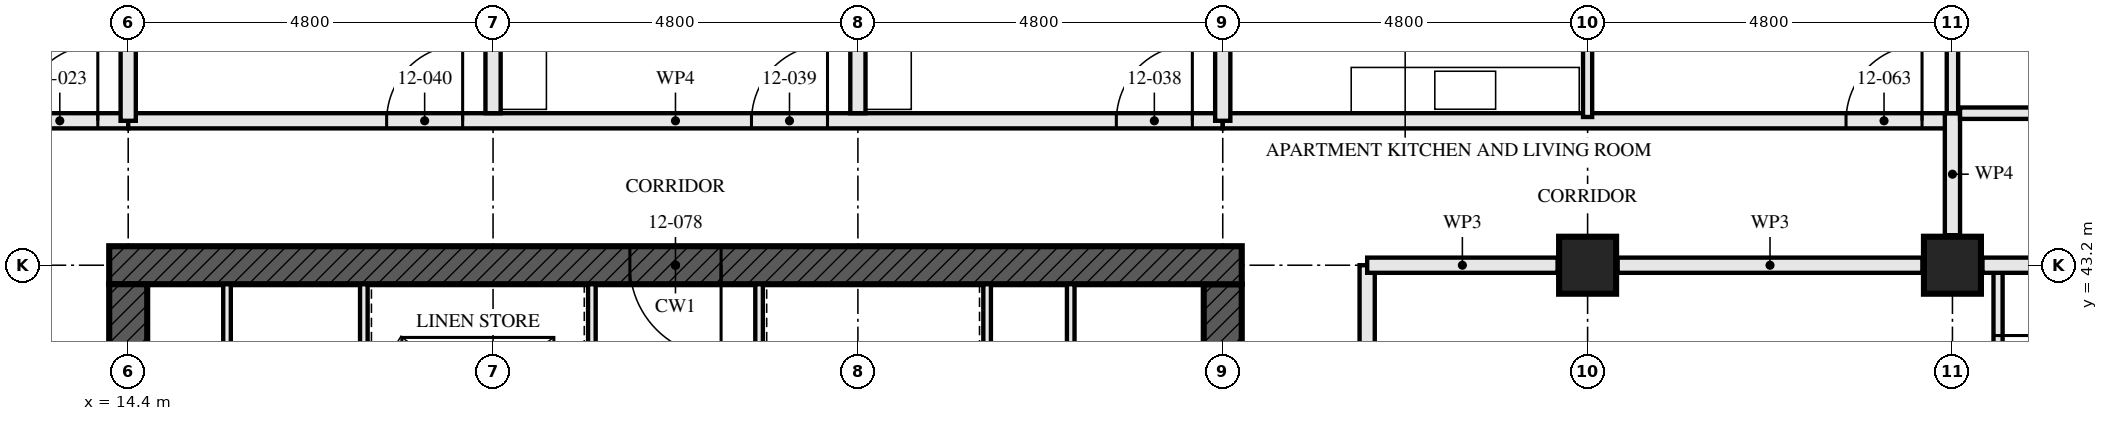
"""IFC4 building model, lengths in metres.
Left out: names, types, materials, properties, quantities, classifications, styles, units other than length and angle.
Written with IfcOpenShell. Run it as: python <this file> out.ifc"""

import sys

from ifc_helpers import new_model, si_unit, direction, frame, frame_2d, origin, origin_2d, place, context, subcontext, project, spatial, rectangle, hollow_rectangle, extrude, element, fill, save


model = new_model("IFC4")
c1 = context("Model", 3, precision=1e-05, world=origin(), true_north=direction((0.0, 1.0)))
c2 = subcontext(c1, "Body", "Model", "MODEL_VIEW")
j1 = project(units=[si_unit("LENGTHUNIT", "METRE"), si_unit("PLANEANGLEUNIT", "RADIAN")], contexts=[c1])
p1 = place(None, origin())
s1 = spatial("IfcSite", under=j1, at=p1, CompositionType="ELEMENT")
p2 = place(p1, origin())
s2 = spatial("IfcBuilding", under=s1, at=p2, CompositionType="ELEMENT")
p3 = place(p2, frame((0.0, 0.0, 48.0)))
s3 = spatial("IfcBuildingStorey", under=s2, at=p3, CompositionType="ELEMENT", Elevation=48.0)
for number, where, z_axis, x_axis in (
    (1, (33.6, 43.2, 0.0), (0.0, 0.0, 1.0), (0.0, 1.0, 0.0)),
    (2, (38.4, 43.2, 0.0), (0.0, 0.0, 1.0), (0.0, 1.0, 0.0)),
):
    element("IfcColumn", number, at=place(p3, frame(where, z_axis=z_axis, x_axis=x_axis)), inside=s3, PredefinedType="COLUMN", context=c2, shape_type="SweptSolid", body=[
        extrude(hollow_rectangle(XDim=0.75, YDim=0.75, WallThickness=0.08, at=origin_2d()), origin(), (0.0, 0.0, 1.0), 3.5),
    ])
p4 = place(p3, frame((29.05, 43.2, -0.17), z_axis=(0.0, 0.0, 1.0), x_axis=(-1.0, 0.0, 0.0)))
e3 = element("IfcWall", 3, at=p4, inside=s3, PredefinedType="SHEAR", context=c2, shape_type="SweptSolid", body=[
    extrude(rectangle(XDim=14.9, YDim=0.5, at=frame_2d((7.45, 0.0))), origin(), (0.0, 0.0, 1.0), 3.5),
])
p5 = place(p4, frame((6.85, 0.0, 0.17)))
e4 = element("IfcOpeningElement", 4, at=p5, cuts=e3, PredefinedType="OPENING", context=c2, shape_type="SweptSolid", body=[
    extrude(rectangle(XDim=1.2, YDim=2.1, at=frame_2d((0.6, 1.05))), frame((0.0, 0.26, 0.0), z_axis=(0.0, -1.0, 0.0), x_axis=(1.0, 0.0, 0.0)), (0.0, 0.0, 1.0), 0.521),
])
p6 = place(p3, frame((14.4, 42.95, -0.17), z_axis=(0.0, 0.0, 1.0), x_axis=(0.0, -1.0, 0.0)))
e5 = element("IfcWall", 5, at=p6, inside=s3, PredefinedType="SHEAR", context=c2, shape_type="SweptSolid", body=[
    extrude(rectangle(XDim=13.9, YDim=0.5, at=frame_2d((6.95, 0.0))), origin(), (0.0, 0.0, 1.0), 3.5),
])
p7 = place(p6, frame((6.35, 0.0, 0.17)))
e6 = element("IfcOpeningElement", 6, at=p7, cuts=e5, PredefinedType="OPENING", context=c2, shape_type="SweptSolid", body=[
    extrude(rectangle(XDim=1.2, YDim=2.1, at=frame_2d((0.6, 1.05))), frame((0.0, 0.26, 0.0), z_axis=(0.0, -1.0, 0.0), x_axis=(1.0, 0.0, 0.0)), (0.0, 0.0, 1.0), 0.521),
])
p8 = place(p3, frame((28.8, 29.05, -0.17), z_axis=(0.0, 0.0, 1.0), x_axis=(0.0, 1.0, 0.0)))
e7 = element("IfcWall", 7, at=p8, inside=s3, PredefinedType="SHEAR", context=c2, shape_type="SweptSolid", body=[
    extrude(rectangle(XDim=13.9, YDim=0.5, at=frame_2d((6.95, 0.0))), origin(), (0.0, 0.0, 1.0), 3.5),
])
p9 = place(p8, frame((6.35, 0.0, 0.17)))
e8 = element("IfcOpeningElement", 8, at=p9, cuts=e7, PredefinedType="OPENING", context=c2, shape_type="SweptSolid", body=[
    extrude(rectangle(XDim=1.2, YDim=2.1, at=frame_2d((0.6, 1.05))), frame((0.0, 0.26, 0.0), z_axis=(0.0, -1.0, 0.0), x_axis=(1.0, 0.0, 0.0)), (0.0, 0.0, 1.0), 0.521),
])
p10 = place(p3, frame((14.4, 45.1, 0.0), z_axis=(0.0, 0.0, 1.0), x_axis=(-1.0, 0.0, 0.0)))
e9 = element("IfcWall", 9, at=p10, inside=s3, PredefinedType="PARTITIONING", context=c2, shape_type="SweptSolid", body=[
    extrude(rectangle(XDim=9.6, YDim=0.2, at=frame_2d((4.8, 0.0))), origin(), (0.0, 0.0, 1.0), 3.33),
])
p11 = place(p10, frame((0.4, 0.0, 0.0)))
e10 = element("IfcOpeningElement", 10, at=p11, cuts=e9, PredefinedType="OPENING", context=c2, shape_type="SweptSolid", body=[
    extrude(rectangle(XDim=1.0, YDim=2.1, at=frame_2d((0.5, 1.05))), frame((0.0, 0.111, 0.0), z_axis=(0.0, -1.0, 0.0), x_axis=(1.0, 0.0, 0.0)), (0.0, 0.0, 1.0), 0.221),
])
for number, where, z_axis, x_axis in (
    (11, (24.0, 57.255, 0.0), (0.0, 0.0, 1.0), (0.0, -1.0, 0.0)),
    (12, (19.2, 57.255, 0.0), (0.0, 0.0, 1.0), (0.0, -1.0, 0.0)),
):
    element("IfcWall", number, at=place(p3, frame(where, z_axis=z_axis, x_axis=x_axis)), inside=s3, PredefinedType="PARTITIONING", context=c2, shape_type="SweptSolid", body=[
        extrude(rectangle(XDim=12.055, YDim=0.2, at=frame_2d((6.027, 0.0))), origin(), (0.0, 0.0, 1.0), 2.55),
    ])
p12 = place(p3, frame((28.8, 45.1, 0.0), z_axis=(0.0, 0.0, 1.0), x_axis=(-1.0, 0.0, 0.0)))
e13 = element("IfcWall", 13, at=p12, inside=s3, PredefinedType="PARTITIONING", context=c2, shape_type="SweptSolid", body=[
    extrude(rectangle(XDim=14.4, YDim=0.2, at=frame_2d((7.2, 0.0))), origin(), (0.0, 0.0, 1.0), 3.33),
])
p13 = place(p12, frame((0.4, 0.0, 0.0)))
e14 = element("IfcOpeningElement", 14, at=p13, cuts=e13, PredefinedType="OPENING", context=c2, shape_type="SweptSolid", body=[
    extrude(rectangle(XDim=1.0, YDim=2.1, at=frame_2d((0.5, 1.05))), frame((0.0, 0.111, 0.0), z_axis=(0.0, -1.0, 0.0), x_axis=(1.0, 0.0, 0.0)), (0.0, 0.0, 1.0), 0.221),
])
p14 = place(p12, frame((5.2, 0.0, 0.0)))
e15 = element("IfcOpeningElement", 15, at=p14, cuts=e13, PredefinedType="OPENING", context=c2, shape_type="SweptSolid", body=[
    extrude(rectangle(XDim=1.0, YDim=2.1, at=frame_2d((0.5, 1.05))), frame((0.0, 0.111, 0.0), z_axis=(0.0, -1.0, 0.0), x_axis=(1.0, 0.0, 0.0)), (0.0, 0.0, 1.0), 0.221),
])
p15 = place(p12, frame((10.0, 0.0, 0.0)))
e16 = element("IfcOpeningElement", 16, at=p15, cuts=e13, PredefinedType="OPENING", context=c2, shape_type="SweptSolid", body=[
    extrude(rectangle(XDim=1.0, YDim=2.1, at=frame_2d((0.5, 1.05))), frame((0.0, 0.111, 0.0), z_axis=(0.0, -1.0, 0.0), x_axis=(1.0, 0.0, 0.0)), (0.0, 0.0, 1.0), 0.221),
])
p16 = place(p3, frame((39.0, 38.4, 0.0), z_axis=(0.0, 0.0, 1.0), x_axis=(0.0, 1.0, 0.0)))
e17 = element("IfcWall", 17, at=p16, inside=s3, PredefinedType="PARTITIONING", context=c2, shape_type="SweptSolid", body=[
    extrude(rectangle(XDim=4.8, YDim=0.12, at=frame_2d((2.4, 0.0))), origin(), (0.0, 0.0, 1.0), 3.33),
])
p17 = place(p16, frame((2.975, 0.0, 0.0)))
e18 = element("IfcOpeningElement", 18, at=p17, cuts=e17, PredefinedType="OPENING", context=c2, shape_type="SweptSolid", body=[
    extrude(rectangle(XDim=0.9, YDim=2.1, at=frame_2d((0.45, 1.05))), frame((0.0, 0.071, 0.0), z_axis=(0.0, -1.0, 0.0), x_axis=(1.0, 0.0, 0.0)), (0.0, 0.0, 1.0), 0.141),
])
p18 = place(p3, frame((30.7, 28.8, 0.0), z_axis=(0.0, 0.0, 1.0), x_axis=(0.0, 1.0, 0.0)))
e19 = element("IfcWall", 19, at=p18, inside=s3, PredefinedType="PARTITIONING", context=c2, shape_type="SweptSolid", body=[
    extrude(rectangle(XDim=14.4, YDim=0.2, at=frame_2d((7.2, 0.0))), origin(), (0.0, 0.0, 1.0), 2.55),
])
p19 = place(p18, frame((1.4, 0.0, 0.0)))
e20 = element("IfcOpeningElement", 20, at=p19, cuts=e19, PredefinedType="OPENING", context=c2, shape_type="SweptSolid", body=[
    extrude(rectangle(XDim=1.0, YDim=2.1, at=frame_2d((0.5, 1.05))), frame((0.0, 0.111, 0.0), z_axis=(0.0, -1.0, 0.0), x_axis=(1.0, 0.0, 0.0)), (0.0, 0.0, 1.0), 0.221),
])
p20 = place(p18, frame((4.1, 0.0, 0.0)))
e21 = element("IfcOpeningElement", 21, at=p20, cuts=e19, PredefinedType="OPENING", context=c2, shape_type="SweptSolid", body=[
    extrude(rectangle(XDim=1.0, YDim=2.1, at=frame_2d((0.5, 1.05))), frame((0.0, 0.111, 0.0), z_axis=(0.0, -1.0, 0.0), x_axis=(1.0, 0.0, 0.0)), (0.0, 0.0, 1.0), 0.221),
])
p21 = place(p18, frame((5.975, 0.0, 0.0)))
e22 = element("IfcOpeningElement", 22, at=p21, cuts=e19, PredefinedType="OPENING", context=c2, shape_type="SweptSolid", body=[
    extrude(rectangle(XDim=1.0, YDim=2.1, at=frame_2d((0.5, 1.05))), frame((0.0, 0.111, 0.0), z_axis=(0.0, -1.0, 0.0), x_axis=(1.0, 0.0, 0.0)), (0.0, 0.0, 1.0), 0.221),
])
p22 = place(p18, frame((10.0, 0.0, 0.0)))
e23 = element("IfcOpeningElement", 23, at=p22, cuts=e19, PredefinedType="OPENING", context=c2, shape_type="SweptSolid", body=[
    extrude(rectangle(XDim=1.0, YDim=2.1, at=frame_2d((0.5, 1.05))), frame((0.0, 0.111, 0.0), z_axis=(0.0, -1.0, 0.0), x_axis=(1.0, 0.0, 0.0)), (0.0, 0.0, 1.0), 0.221),
])
p23 = place(p3, frame((38.4, 48.2, 0.0), z_axis=(0.0, 0.0, 1.0), x_axis=(0.0, -1.0, 0.0)))
e24 = element("IfcWall", 24, at=p23, inside=s3, PredefinedType="PARTITIONING", context=c2, shape_type="SweptSolid", body=[
    extrude(rectangle(XDim=3.0, YDim=0.15, at=frame_2d((1.5, 0.0))), origin(), (0.0, 0.0, 1.0), 2.55),
])
p24 = place(p23, frame((1.05, 0.0, 0.0)))
e25 = element("IfcOpeningElement", 25, at=p24, cuts=e24, PredefinedType="OPENING", context=c2, shape_type="SweptSolid", body=[
    extrude(rectangle(XDim=0.9, YDim=2.1, at=frame_2d((0.45, 1.05))), frame((0.0, 0.085, 0.0), z_axis=(0.0, -1.0, 0.0), x_axis=(1.0, 0.0, 0.0)), (0.0, 0.0, 1.0), 0.171),
])
p25 = place(p3, frame((33.6, 53.4, 0.0), z_axis=(0.0, 0.0, 1.0), x_axis=(0.0, -1.0, 0.0)))
e26 = element("IfcWall", 26, at=p25, inside=s3, PredefinedType="PARTITIONING", context=c2, shape_type="SweptSolid", body=[
    extrude(rectangle(XDim=8.25, YDim=0.12, at=frame_2d((4.125, 0.0))), origin(), (0.0, 0.0, 1.0), 2.55),
])
p26 = place(p25, frame((5.15, 0.0, 0.0)))
e27 = element("IfcOpeningElement", 27, at=p26, cuts=e26, PredefinedType="OPENING", context=c2, shape_type="SweptSolid", body=[
    extrude(rectangle(XDim=0.9, YDim=2.1, at=frame_2d((0.45, 1.05))), frame((0.0, 0.071, 0.0), z_axis=(0.0, -1.0, 0.0), x_axis=(1.0, 0.0, 0.0)), (0.0, 0.0, 1.0), 0.141),
])
p27 = place(p3, frame((38.4, 45.1, 0.0), z_axis=(0.0, 0.0, 1.0), x_axis=(-1.0, 0.0, 0.0)))
e28 = element("IfcWall", 28, at=p27, inside=s3, PredefinedType="PARTITIONING", context=c2, shape_type="SweptSolid", body=[
    extrude(rectangle(XDim=9.6, YDim=0.2, at=frame_2d((4.8, 0.0))), origin(), (0.0, 0.0, 1.0), 3.33),
])
p28 = place(p27, frame((0.4, 0.0, 0.0)))
e29 = element("IfcOpeningElement", 29, at=p28, cuts=e28, PredefinedType="OPENING", context=c2, shape_type="SweptSolid", body=[
    extrude(rectangle(XDim=1.0, YDim=2.1, at=frame_2d((0.5, 1.05))), frame((0.0, 0.111, 0.0), z_axis=(0.0, -1.0, 0.0), x_axis=(1.0, 0.0, 0.0)), (0.0, 0.0, 1.0), 0.221),
])
p29 = place(p3, frame((38.4, 45.2, 0.0), z_axis=(0.0, 0.0, 1.0), x_axis=(0.0, -1.0, 0.0)))
e30 = element("IfcWall", 30, at=p29, inside=s3, PredefinedType="PARTITIONING", context=c2, shape_type="SweptSolid", body=[
    extrude(rectangle(XDim=1.605, YDim=0.2, at=frame_2d((0.802, 0.0))), origin(), (0.0, 0.0, 1.0), 3.33),
])
for number, where, z_axis, x_axis in (
    (31, (15.7, 37.15, 0.0), (0.0, 0.0, 1.0), (0.0, 1.0, 0.0)),
    (32, (26.8, 37.15, 0.0), (0.0, 0.0, 1.0), (0.0, 1.0, 0.0)),
):
    element("IfcWall", number, at=place(p3, frame(where, z_axis=z_axis, x_axis=x_axis)), inside=s3, PredefinedType="SOLIDWALL", context=c2, shape_type="SweptSolid", body=[
        extrude(rectangle(XDim=5.8, YDim=0.1, at=frame_2d((2.9, 0.0))), origin(), (0.0, 0.0, 1.0), 3.33),
    ])
p30 = place(p3, frame((20.5, 37.15, 0.0), z_axis=(0.0, 0.0, 1.0), x_axis=(0.0, 1.0, 0.0)))
e33 = element("IfcWall", 33, at=p30, inside=s3, PredefinedType="SOLIDWALL", context=c2, shape_type="SweptSolid", body=[
    extrude(rectangle(XDim=5.8, YDim=0.1, at=frame_2d((2.9, 0.0))), origin(), (0.0, 0.0, 1.0), 3.33),
])
p31 = place(p30, frame((0.925, 0.0, 0.0)))
e34 = element("IfcOpeningElement", 34, at=p31, cuts=e33, PredefinedType="OPENING", context=c2, shape_type="SweptSolid", body=[
    extrude(rectangle(XDim=1.0, YDim=2.1, at=frame_2d((0.5, 1.05))), frame((0.0, 0.061, 0.0), z_axis=(0.0, -1.0, 0.0), x_axis=(1.0, 0.0, 0.0)), (0.0, 0.0, 1.0), 0.121),
])
p32 = place(p30, frame((3.9, 0.0, 0.0)))
e35 = element("IfcOpeningElement", 35, at=p32, cuts=e33, PredefinedType="OPENING", context=c2, shape_type="SweptSolid", body=[
    extrude(rectangle(XDim=1.0, YDim=2.1, at=frame_2d((0.5, 1.05))), frame((0.0, 0.061, 0.0), z_axis=(0.0, -1.0, 0.0), x_axis=(1.0, 0.0, 0.0)), (0.0, 0.0, 1.0), 0.121),
])
for number, where, z_axis, x_axis in (
    (36, (22.7, 37.15, 0.0), (0.0, 0.0, 1.0), (0.0, 1.0, 0.0)),
    (37, (17.5, 37.15, 0.0), (0.0, 0.0, 1.0), (0.0, 1.0, 0.0)),
    (38, (25.7, 37.15, 0.0), (0.0, 0.0, 1.0), (0.0, 1.0, 0.0)),
):
    element("IfcWall", number, at=place(p3, frame(where, z_axis=z_axis, x_axis=x_axis)), inside=s3, PredefinedType="SOLIDWALL", context=c2, shape_type="SweptSolid", body=[
        extrude(rectangle(XDim=5.8, YDim=0.1, at=frame_2d((2.9, 0.0))), origin(), (0.0, 0.0, 1.0), 3.33),
    ])
for number, where, z_axis, x_axis in (
    (39, (14.4, 45.1, 0.0), (0.0, 0.0, 1.0), (0.0, 1.0, 0.0)),
    (40, (28.8, 45.1, 0.0), (0.0, 0.0, 1.0), (0.0, 1.0, 0.0)),
):
    element("IfcWall", number, at=place(p3, frame(where, z_axis=z_axis, x_axis=x_axis)), inside=s3, PredefinedType="PARTITIONING", context=c2, shape_type="SweptSolid", body=[
        extrude(rectangle(XDim=2.555, YDim=0.2, at=frame_2d((1.277, 0.0))), origin(), (0.0, 0.0, 1.0), 2.32),
    ])
p33 = place(p3, frame((42.896, 43.2, 0.0), z_axis=(0.0, 0.0, 1.0), x_axis=(-1.0, 0.0, 0.0)))
e41 = element("IfcWall", 41, at=p33, inside=s3, PredefinedType="PARTITIONING", context=c2, shape_type="SweptSolid", body=[
    extrude(rectangle(XDim=4.101, YDim=0.2, at=frame_2d((2.05, 0.0))), origin(), (0.0, 0.0, 1.0), 2.32),
])
p34 = place(p3, frame((38.005, 43.2, 0.0), z_axis=(0.0, 0.0, 1.0), x_axis=(-1.0, 0.0, 0.0)))
e42 = element("IfcWall", 42, at=p34, inside=s3, PredefinedType="PARTITIONING", context=c2, shape_type="SweptSolid", body=[
    extrude(rectangle(XDim=4.01, YDim=0.2, at=frame_2d((2.005, 0.0))), origin(), (0.0, 0.0, 1.0), 2.32),
])
p35 = place(p3, frame((33.205, 43.2, 0.0), z_axis=(0.0, 0.0, 1.0), x_axis=(-1.0, 0.0, 0.0)))
e43 = element("IfcWall", 43, at=p35, inside=s3, PredefinedType="PARTITIONING", context=c2, shape_type="SweptSolid", body=[
    extrude(rectangle(XDim=2.505, YDim=0.2, at=frame_2d((1.252, 0.0))), origin(), (0.0, 0.0, 1.0), 2.32),
])
p36 = place(p3, frame((43.63, 45.2, 0.0), z_axis=(0.0, 0.0, 1.0), x_axis=(-1.0, 0.0, 0.0)))
e44 = element("IfcWall", 44, at=p36, inside=s3, PredefinedType="PARTITIONING", context=c2, shape_type="SweptSolid", body=[
    extrude(rectangle(XDim=5.13, YDim=0.15, at=frame_2d((2.565, 0.0))), origin(), (0.0, 0.0, 1.0), 2.32),
])
p37 = place(p11, frame((1.0, 0.0, 0.0), z_axis=(0.0, 0.0, 1.0), x_axis=(-1.0, 0.0, 0.0)))
e45 = element("IfcDoor", 45, at=p37, inside=s3, OperationType="SINGLE_SWING_LEFT", PredefinedType="DOOR", context=c2, shape_type="SweptSolid", body=[
    extrude(rectangle(XDim=1.0, YDim=2.1, at=frame_2d((0.5, 1.05))), frame((0.0, 0.027, 0.0), z_axis=(0.0, -1.0, 0.0), x_axis=(1.0, 0.0, 0.0)), (0.0, 0.0, 1.0), 0.054),
])
fill(e10, e45)
p38 = place(p13, frame((1.0, 0.0, 0.0), z_axis=(0.0, 0.0, 1.0), x_axis=(-1.0, 0.0, 0.0)))
e46 = element("IfcDoor", 46, at=p38, inside=s3, OperationType="SINGLE_SWING_LEFT", PredefinedType="DOOR", context=c2, shape_type="SweptSolid", body=[
    extrude(rectangle(XDim=1.0, YDim=2.1, at=frame_2d((0.5, 1.05))), frame((0.0, 0.027, 0.0), z_axis=(0.0, -1.0, 0.0), x_axis=(1.0, 0.0, 0.0)), (0.0, 0.0, 1.0), 0.054),
])
fill(e14, e46)
p39 = place(p14, frame((1.0, 0.0, 0.0), z_axis=(0.0, 0.0, 1.0), x_axis=(-1.0, 0.0, 0.0)))
e47 = element("IfcDoor", 47, at=p39, inside=s3, OperationType="SINGLE_SWING_LEFT", PredefinedType="DOOR", context=c2, shape_type="SweptSolid", body=[
    extrude(rectangle(XDim=1.0, YDim=2.1, at=frame_2d((0.5, 1.05))), frame((0.0, 0.027, 0.0), z_axis=(0.0, -1.0, 0.0), x_axis=(1.0, 0.0, 0.0)), (0.0, 0.0, 1.0), 0.054),
])
fill(e15, e47)
p40 = place(p15, frame((1.0, 0.0, 0.0), z_axis=(0.0, 0.0, 1.0), x_axis=(-1.0, 0.0, 0.0)))
e48 = element("IfcDoor", 48, at=p40, inside=s3, OperationType="SINGLE_SWING_LEFT", PredefinedType="DOOR", context=c2, shape_type="SweptSolid", body=[
    extrude(rectangle(XDim=1.0, YDim=2.1, at=frame_2d((0.5, 1.05))), frame((0.0, 0.027, 0.0), z_axis=(0.0, -1.0, 0.0), x_axis=(1.0, 0.0, 0.0)), (0.0, 0.0, 1.0), 0.054),
])
fill(e16, e48)
p41 = place(p17, frame((0.9, 0.0, 0.0), z_axis=(0.0, 0.0, 1.0), x_axis=(-1.0, 0.0, 0.0)))
e49 = element("IfcDoor", 49, at=p41, inside=s3, OperationType="SINGLE_SWING_RIGHT", PredefinedType="DOOR", context=c2, shape_type="SweptSolid", body=[
    extrude(rectangle(XDim=0.9, YDim=2.1, at=frame_2d((0.45, 1.05))), frame((0.0, 0.022, 0.0), z_axis=(0.0, -1.0, 0.0), x_axis=(1.0, 0.0, 0.0)), (0.0, 0.0, 1.0), 0.044),
])
fill(e18, e49)
p42 = place(p28, frame((1.0, 0.0, 0.0), z_axis=(0.0, 0.0, 1.0), x_axis=(-1.0, 0.0, 0.0)))
e50 = element("IfcDoor", 50, at=p42, inside=s3, OperationType="SINGLE_SWING_LEFT", PredefinedType="DOOR", context=c2, shape_type="SweptSolid", body=[
    extrude(rectangle(XDim=1.0, YDim=2.1, at=frame_2d((0.5, 1.05))), frame((0.0, 0.027, 0.0), z_axis=(0.0, -1.0, 0.0), x_axis=(1.0, 0.0, 0.0)), (0.0, 0.0, 1.0), 0.054),
])
fill(e29, e50)
p43 = place(p5, origin())
e51 = element("IfcDoor", 51, at=p43, inside=s3, OperationType="SINGLE_SWING_LEFT", PredefinedType="DOOR", context=c2, shape_type="SweptSolid", body=[
    extrude(rectangle(XDim=1.2, YDim=2.1, at=frame_2d((0.6, 1.05))), frame((0.0, 0.027, 0.0), z_axis=(0.0, -1.0, 0.0), x_axis=(1.0, 0.0, 0.0)), (0.0, 0.0, 1.0), 0.054),
])
fill(e4, e51)
save(model, sys.argv[1])
